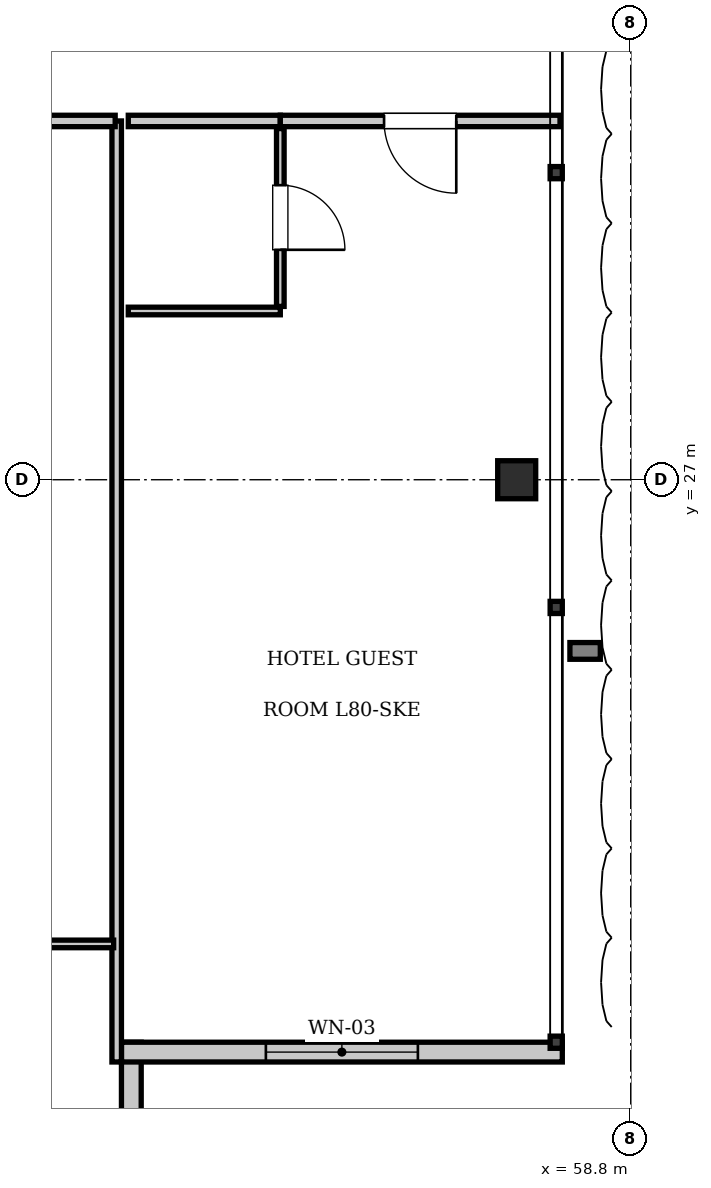
"""IFC4 building model, lengths in metres.
Left out: names, types, materials, properties, quantities, classifications, styles, units other than length and angle.
Written with IfcOpenShell. Run it as: python <this file> out.ifc"""

import sys

from ifc_helpers import new_model, si_unit, direction, frame, frame_2d, origin, origin_2d, place, context, subcontext, project, spatial, rectangle, i_section, extrude, element, fill, save


model = new_model("IFC4")
c1 = context("Model", 3, precision=1e-05, world=origin(), true_north=direction((0.0, 1.0)))
c2 = subcontext(c1, "Body", "Model", "MODEL_VIEW")
j1 = project(units=[si_unit("LENGTHUNIT", "METRE"), si_unit("PLANEANGLEUNIT", "RADIAN")], contexts=[c1])
p1 = place(None, origin())
s1 = spatial("IfcSite", under=j1, at=p1, CompositionType="ELEMENT")
p2 = place(p1, origin())
s2 = spatial("IfcBuilding", under=s1, at=p2, CompositionType="ELEMENT")
p3 = place(p2, frame((0.0, 0.0, 325.85)))
s3 = spatial("IfcBuildingStorey", under=s2, at=p3, CompositionType="ELEMENT", Elevation=325.85)
p4 = place(p3, frame((57.3, 27.0, 0.0), z_axis=(0.0, 0.0, 1.0), x_axis=(1.0, 0.0, 0.0)))
e1 = element("IfcColumn", 1, at=p4, inside=s3, PredefinedType="COLUMN", context=c2, shape_type="SweptSolid", body=[
    extrude(i_section(OverallWidth=0.5, OverallDepth=0.5, WebThickness=0.022, FlangeThickness=0.032, at=origin_2d()), origin(), (0.0, 0.0, 1.0), 3.85),
])
p5 = place(p3, frame((52.23, 19.6, 0.0), z_axis=(0.0, 0.0, 1.0), x_axis=(0.0, -1.0, 0.0)))
e2 = element("IfcWall", 2, at=p5, inside=s3, PredefinedType="SOLIDWALL", context=c2, shape_type="SweptSolid", body=[
    extrude(rectangle(XDim=5.8, YDim=0.26, at=frame_2d((2.9, 0.0))), origin(), (0.0, 0.0, 1.0), 3.61),
])
p6 = place(p3, frame((57.9, 19.47, 0.0), z_axis=(0.0, 0.0, 1.0), x_axis=(-1.0, 0.0, 0.0)))
e3 = element("IfcWall", 3, at=p6, inside=s3, PredefinedType="SOLIDWALL", context=c2, shape_type="SweptSolid", body=[
    extrude(rectangle(XDim=5.8, YDim=0.26, at=frame_2d((2.9, 0.0))), origin(), (0.0, 0.0, 1.0), 3.61),
])
p7 = place(p6, frame((1.9, 0.0, 0.9)))
e4 = element("IfcOpeningElement", 4, at=p7, cuts=e3, PredefinedType="OPENING", context=c2, shape_type="SweptSolid", body=[
    extrude(rectangle(XDim=2.0, YDim=2.2, at=frame_2d((1.0, 1.1))), frame((0.0, 0.14, 0.0), z_axis=(0.0, -1.0, 0.0), x_axis=(1.0, 0.0, 0.0)), (0.0, 0.0, 1.0), 0.28),
])
p8 = place(p3, frame((52.038, 19.34, 0.0), z_axis=(0.0, 0.0, 1.0), x_axis=(0.0, 1.0, 0.0)))
e5 = element("IfcWall", 5, at=p8, inside=s3, PredefinedType="PARTITIONING", context=c2, shape_type="SweptSolid", body=[
    extrude(rectangle(XDim=12.38, YDim=0.125, at=frame_2d((6.19, 0.0))), origin(), (0.0, 0.0, 1.0), 3.61),
])
p9 = place(p3, frame((48.37, 31.72, 0.0), z_axis=(0.0, 0.0, 1.0), x_axis=(1.0, 0.0, 0.0)))
e6 = element("IfcWall", 6, at=p9, inside=s3, PredefinedType="PARTITIONING", context=c2, shape_type="SweptSolid", body=[
    extrude(rectangle(XDim=3.647, YDim=0.15, at=frame_2d((1.824, 0.0))), origin(), (0.0, 0.0, 1.0), 3.61),
])
p10 = place(p9, frame((1.349, 0.0, 0.0)))
e7 = element("IfcOpeningElement", 7, at=p10, cuts=e6, PredefinedType="OPENING", context=c2, shape_type="SweptSolid", body=[
    extrude(rectangle(XDim=0.95, YDim=2.15, at=frame_2d((0.475, 1.075))), frame((0.0, 0.085, 0.0), z_axis=(0.0, -1.0, 0.0), x_axis=(1.0, 0.0, 0.0)), (0.0, 0.0, 1.0), 0.17),
])
p11 = place(p3, frame((46.34, 20.893, 0.0), z_axis=(0.0, 0.0, 1.0), x_axis=(1.0, 0.0, 0.0)))
e8 = element("IfcWall", 8, at=p11, inside=s3, PredefinedType="PARTITIONING", context=c2, shape_type="SweptSolid", body=[
    extrude(rectangle(XDim=5.657, YDim=0.1, at=frame_2d((2.829, 0.0))), origin(), (0.0, 0.0, 1.0), 3.61),
])
p12 = place(p11, frame((2.379, 0.0, 0.0)))
e9 = element("IfcOpeningElement", 9, at=p12, cuts=e8, PredefinedType="OPENING", context=c2, shape_type="SweptSolid", body=[
    extrude(rectangle(XDim=0.9, YDim=2.1, at=frame_2d((0.45, 1.05))), frame((0.0, 0.06, 0.0), z_axis=(0.0, -1.0, 0.0), x_axis=(1.0, 0.0, 0.0)), (0.0, 0.0, 1.0), 0.12),
])
p13 = place(p3, frame((52.19, 31.72, 0.0), z_axis=(0.0, 0.0, 1.0), x_axis=(1.0, 0.0, 0.0)))
e10 = element("IfcWall", 10, at=p13, inside=s3, PredefinedType="PARTITIONING", context=c2, shape_type="SweptSolid", body=[
    extrude(rectangle(XDim=2.0, YDim=0.15, at=frame_2d((1.0, 0.0))), origin(), (0.0, 0.0, 1.0), 3.61),
])
p14 = place(p3, frame((52.19, 29.22, 0.0), z_axis=(0.0, 0.0, 1.0), x_axis=(1.0, 0.0, 0.0)))
e11 = element("IfcWall", 11, at=p14, inside=s3, PredefinedType="PARTITIONING", context=c2, shape_type="SweptSolid", body=[
    extrude(rectangle(XDim=2.0, YDim=0.1, at=frame_2d((1.0, 0.0))), origin(), (0.0, 0.0, 1.0), 3.61),
])
p15 = place(p3, frame((54.19, 29.28, 0.0), z_axis=(0.0, 0.0, 1.0), x_axis=(0.0, 1.0, 0.0)))
e12 = element("IfcWall", 12, at=p15, inside=s3, PredefinedType="PARTITIONING", context=c2, shape_type="SweptSolid", body=[
    extrude(rectangle(XDim=2.34, YDim=0.1, at=frame_2d((1.17, 0.0))), origin(), (0.0, 0.0, 1.0), 3.61),
])
p16 = place(p15, frame((0.745, 0.0, 0.0)))
e13 = element("IfcOpeningElement", 13, at=p16, cuts=e12, PredefinedType="OPENING", context=c2, shape_type="SweptSolid", body=[
    extrude(rectangle(XDim=0.85, YDim=2.1, at=frame_2d((0.425, 1.05))), frame((0.0, 0.06, 0.0), z_axis=(0.0, -1.0, 0.0), x_axis=(1.0, 0.0, 0.0)), (0.0, 0.0, 1.0), 0.12),
])
p17 = place(p3, frame((54.19, 31.72, 0.0), z_axis=(0.0, 0.0, 1.0), x_axis=(1.0, 0.0, 0.0)))
e14 = element("IfcWall", 14, at=p17, inside=s3, PredefinedType="PARTITIONING", context=c2, shape_type="SweptSolid", body=[
    extrude(rectangle(XDim=3.68, YDim=0.15, at=frame_2d((1.84, 0.0))), origin(), (0.0, 0.0, 1.0), 3.61),
])
p18 = place(p17, frame((1.365, 0.0, 0.0)))
e15 = element("IfcOpeningElement", 15, at=p18, cuts=e14, PredefinedType="OPENING", context=c2, shape_type="SweptSolid", body=[
    extrude(rectangle(XDim=0.95, YDim=2.15, at=frame_2d((0.475, 1.075))), frame((0.0, 0.085, 0.0), z_axis=(0.0, -1.0, 0.0), x_axis=(1.0, 0.0, 0.0)), (0.0, 0.0, 1.0), 0.17),
])
p19 = place(p7, origin())
e16 = element("IfcWindow", 16, at=p19, inside=s3, PartitioningType="SINGLE_PANEL", PredefinedType="WINDOW", context=c2, shape_type="SweptSolid", body=[
    extrude(rectangle(XDim=2.0, YDim=2.2, at=frame_2d((1.0, 1.1))), frame((0.0, 0.03, 0.0), z_axis=(0.0, -1.0, 0.0), x_axis=(1.0, 0.0, 0.0)), (0.0, 0.0, 1.0), 0.06),
])
fill(e4, e16)
p20 = place(p16, frame((0.85, 0.0, 0.0), z_axis=(0.0, 0.0, 1.0), x_axis=(-1.0, 0.0, 0.0)))
e17 = element("IfcDoor", 17, at=p20, inside=s3, OperationType="SINGLE_SWING_RIGHT", PredefinedType="DOOR", context=c2, shape_type="SweptSolid", body=[
    extrude(rectangle(XDim=0.85, YDim=2.1, at=frame_2d((0.425, 1.05))), frame((0.0, 0.025, 0.0), z_axis=(0.0, -1.0, 0.0), x_axis=(1.0, 0.0, 0.0)), (0.0, 0.0, 1.0), 0.05),
])
fill(e13, e17)
p21 = place(p18, frame((0.95, 0.0, 0.0), z_axis=(0.0, 0.0, 1.0), x_axis=(-1.0, 0.0, 0.0)))
e18 = element("IfcDoor", 18, at=p21, inside=s3, OperationType="SINGLE_SWING_LEFT", PredefinedType="DOOR", context=c2, shape_type="SweptSolid", body=[
    extrude(rectangle(XDim=0.95, YDim=2.15, at=frame_2d((0.475, 1.075))), frame((0.0, 0.025, 0.0), z_axis=(0.0, -1.0, 0.0), x_axis=(1.0, 0.0, 0.0)), (0.0, 0.0, 1.0), 0.05),
])
fill(e15, e18)
save(model, sys.argv[1])
